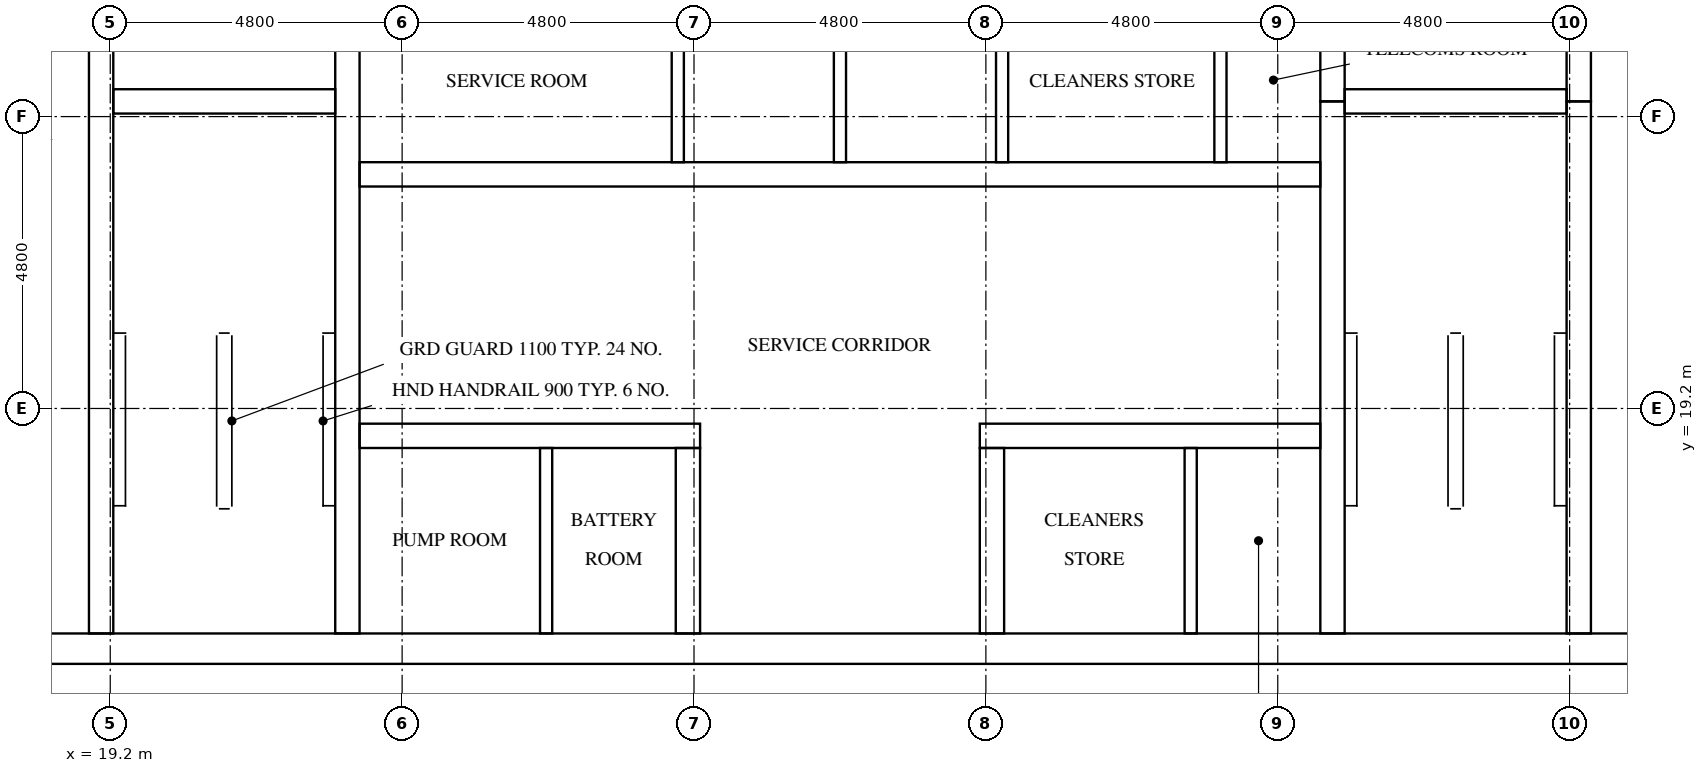
"""IFC4 building model, lengths in metres.
Left out: names, types, materials, properties, quantities, classifications, styles, units other than length and angle.
Written with IfcOpenShell. Run it as: python <this file> out.ifc"""

import sys

from ifc_helpers import new_model, si_unit, direction, frame, frame_2d, origin, place, context, subcontext, project, spatial, rectangle, extrude, element, fill, save


model = new_model("IFC4")
c1 = context("Model", 3, precision=1e-05, world=origin(), true_north=direction((0.0, 1.0)))
c2 = subcontext(c1, "Body", "Model", "MODEL_VIEW")
j1 = project(units=[si_unit("LENGTHUNIT", "METRE"), si_unit("PLANEANGLEUNIT", "RADIAN")], contexts=[c1])
p1 = place(None, origin())
s1 = spatial("IfcSite", under=j1, at=p1, CompositionType="ELEMENT")
p2 = place(p1, origin())
s2 = spatial("IfcBuilding", under=s1, at=p2, CompositionType="ELEMENT")
p3 = place(p2, frame((0.0, 0.0, 282.6)))
s3 = spatial("IfcBuildingStorey", under=s2, at=p3, CompositionType="ELEMENT", Elevation=282.6)
p4 = place(p3, frame((15.0, 15.25, 0.0), z_axis=(0.0, 0.0, 1.0), x_axis=(1.0, 0.0, 0.0)))
e1 = element("IfcWall", 1, at=p4, inside=s3, PredefinedType="SHEAR", context=c2, shape_type="SweptSolid", body=[
    extrude(rectangle(XDim=32.4, YDim=0.5, at=frame_2d((16.2, 0.0))), origin(), (0.0, 0.0, 1.0), 3.2),
])
p5 = place(p4, frame((15.3, 0.0, 0.0)))
e2 = element("IfcOpeningElement", 2, at=p5, cuts=e1, PredefinedType="OPENING", context=c2, shape_type="SweptSolid", body=[
    extrude(rectangle(XDim=1.8, YDim=2.1, at=frame_2d((0.9, 1.05))), frame((0.0, 0.26, 0.0), z_axis=(0.0, -1.0, 0.0), x_axis=(1.0, 0.0, 0.0)), (0.0, 0.0, 1.0), 0.52),
])
p6 = place(p3, frame((19.05, 15.5, 0.0), z_axis=(0.0, 0.0, 1.0), x_axis=(0.0, 1.0, 0.0)))
e3 = element("IfcWall", 3, at=p6, inside=s3, PredefinedType="SHEAR", context=c2, shape_type="SweptSolid", body=[
    extrude(rectangle(XDim=15.55, YDim=0.4, at=frame_2d((7.775, 0.0))), origin(), (0.0, 0.0, 1.0), 3.2),
])
p7 = place(p6, frame((9.95, 0.0, 0.0)))
e4 = element("IfcOpeningElement", 4, at=p7, cuts=e3, PredefinedType="OPENING", context=c2, shape_type="SweptSolid", body=[
    extrude(rectangle(XDim=1.1, YDim=2.1, at=frame_2d((0.55, 1.05))), frame((0.0, 0.21, 0.0), z_axis=(0.0, -1.0, 0.0), x_axis=(1.0, 0.0, 0.0)), (0.0, 0.0, 1.0), 0.42),
])
p8 = place(p6, frame((13.45, 0.0, 0.0)))
e5 = element("IfcOpeningElement", 5, at=p8, cuts=e3, PredefinedType="OPENING", context=c2, shape_type="SweptSolid", body=[
    extrude(rectangle(XDim=1.1, YDim=2.1, at=frame_2d((0.55, 1.05))), frame((0.0, 0.21, 0.0), z_axis=(0.0, -1.0, 0.0), x_axis=(1.0, 0.0, 0.0)), (0.0, 0.0, 1.0), 0.42),
])
p9 = place(p6, frame((0.7, 0.0, 0.0)))
e6 = element("IfcOpeningElement", 6, at=p9, cuts=e3, PredefinedType="OPENING", context=c2, shape_type="SweptSolid", body=[
    extrude(rectangle(XDim=1.2, YDim=2.1, at=frame_2d((0.6, 1.05))), frame((0.0, 0.21, 0.0), z_axis=(0.0, -1.0, 0.0), x_axis=(1.0, 0.0, 0.0)), (0.0, 0.0, 1.0), 0.42),
])
p10 = place(p3, frame((23.1, 15.5, 0.0), z_axis=(0.0, 0.0, 1.0), x_axis=(0.0, 1.0, 0.0)))
e7 = element("IfcWall", 7, at=p10, inside=s3, PredefinedType="SHEAR", context=c2, shape_type="SweptSolid", body=[
    extrude(rectangle(XDim=21.8, YDim=0.4, at=frame_2d((10.9, 0.0))), origin(), (0.0, 0.0, 1.0), 3.2),
])
p11 = place(p3, frame((39.3, 15.5, 0.0), z_axis=(0.0, 0.0, 1.0), x_axis=(0.0, 1.0, 0.0)))
e8 = element("IfcWall", 8, at=p11, inside=s3, PredefinedType="SHEAR", context=c2, shape_type="SweptSolid", body=[
    extrude(rectangle(XDim=8.75, YDim=0.4, at=frame_2d((4.375, 0.0))), origin(), (0.0, 0.0, 1.0), 3.2),
])
p12 = place(p3, frame((39.3, 24.25, 0.0), z_axis=(0.0, 0.0, 1.0), x_axis=(0.0, 1.0, 0.0)))
e9 = element("IfcWall", 9, at=p12, inside=s3, PredefinedType="SHEAR", context=c2, shape_type="SweptSolid", body=[
    extrude(rectangle(XDim=3.5, YDim=0.4, at=frame_2d((1.75, 0.0))), origin(), (0.0, 0.0, 1.0), 3.2),
])
p13 = place(p3, frame((43.35, 15.5, 0.0), z_axis=(0.0, 0.0, 1.0), x_axis=(0.0, 1.0, 0.0)))
e10 = element("IfcWall", 10, at=p13, inside=s3, PredefinedType="SHEAR", context=c2, shape_type="SweptSolid", body=[
    extrude(rectangle(XDim=8.75, YDim=0.4, at=frame_2d((4.375, 0.0))), origin(), (0.0, 0.0, 1.0), 3.2),
])
p14 = place(p13, frame((0.7, 0.0, 0.0)))
e11 = element("IfcOpeningElement", 11, at=p14, cuts=e10, PredefinedType="OPENING", context=c2, shape_type="SweptSolid", body=[
    extrude(rectangle(XDim=1.2, YDim=2.1, at=frame_2d((0.6, 1.05))), frame((0.0, 0.21, 0.0), z_axis=(0.0, -1.0, 0.0), x_axis=(1.0, 0.0, 0.0)), (0.0, 0.0, 1.0), 0.42),
])
p15 = place(p3, frame((43.35, 24.25, 0.0), z_axis=(0.0, 0.0, 1.0), x_axis=(0.0, 1.0, 0.0)))
e12 = element("IfcWall", 12, at=p15, inside=s3, PredefinedType="SHEAR", context=c2, shape_type="SweptSolid", body=[
    extrude(rectangle(XDim=3.5, YDim=0.4, at=frame_2d((1.75, 0.0))), origin(), (0.0, 0.0, 1.0), 3.2),
])
p16 = place(p15, frame((1.2, 0.0, 0.0)))
e13 = element("IfcOpeningElement", 13, at=p16, cuts=e12, PredefinedType="OPENING", context=c2, shape_type="SweptSolid", body=[
    extrude(rectangle(XDim=1.1, YDim=2.1, at=frame_2d((0.55, 1.05))), frame((0.0, 0.21, 0.0), z_axis=(0.0, -1.0, 0.0), x_axis=(1.0, 0.0, 0.0)), (0.0, 0.0, 1.0), 0.42),
])
for number, where, z_axis, x_axis in (
    (14, (19.25, 24.25, 0.0), (0.0, 0.0, 1.0), (1.0, 0.0, 0.0)),
    (15, (39.5, 24.25, 0.0), (0.0, 0.0, 1.0), (1.0, 0.0, 0.0)),
):
    element("IfcWall", number, at=place(p3, frame(where, z_axis=z_axis, x_axis=x_axis)), inside=s3, PredefinedType="SHEAR", context=c2, shape_type="SweptSolid", body=[
        extrude(rectangle(XDim=3.65, YDim=0.4, at=frame_2d((1.825, 0.0))), origin(), (0.0, 0.0, 1.0), 3.2),
    ])
p17 = place(p3, frame((23.3, 18.75, 0.0), z_axis=(0.0, 0.0, 1.0), x_axis=(1.0, 0.0, 0.0)))
e16 = element("IfcWall", 16, at=p17, inside=s3, PredefinedType="SHEAR", context=c2, shape_type="SweptSolid", body=[
    extrude(rectangle(XDim=5.6, YDim=0.4, at=frame_2d((2.8, 0.0))), origin(), (0.0, 0.0, 1.0), 3.2),
])
p18 = place(p17, frame((0.984, 0.0, 0.0)))
e17 = element("IfcOpeningElement", 17, at=p18, cuts=e16, PredefinedType="OPENING", context=c2, shape_type="SweptSolid", body=[
    extrude(rectangle(XDim=1.0, YDim=2.1, at=frame_2d((0.5, 1.05))), frame((0.0, 0.21, 0.0), z_axis=(0.0, -1.0, 0.0), x_axis=(1.0, 0.0, 0.0)), (0.0, 0.0, 1.0), 0.42),
])
p19 = place(p17, frame((3.684, 0.0, 0.0)))
e18 = element("IfcOpeningElement", 18, at=p19, cuts=e16, PredefinedType="OPENING", context=c2, shape_type="SweptSolid", body=[
    extrude(rectangle(XDim=1.0, YDim=2.1, at=frame_2d((0.5, 1.05))), frame((0.0, 0.21, 0.0), z_axis=(0.0, -1.0, 0.0), x_axis=(1.0, 0.0, 0.0)), (0.0, 0.0, 1.0), 0.42),
])
p20 = place(p3, frame((33.5, 18.75, 0.0), z_axis=(0.0, 0.0, 1.0), x_axis=(1.0, 0.0, 0.0)))
e19 = element("IfcWall", 19, at=p20, inside=s3, PredefinedType="SHEAR", context=c2, shape_type="SweptSolid", body=[
    extrude(rectangle(XDim=5.6, YDim=0.4, at=frame_2d((2.8, 0.0))), origin(), (0.0, 0.0, 1.0), 3.2),
])
p21 = place(p20, frame((1.384, 0.0, 0.0)))
e20 = element("IfcOpeningElement", 20, at=p21, cuts=e19, PredefinedType="OPENING", context=c2, shape_type="SweptSolid", body=[
    extrude(rectangle(XDim=1.0, YDim=2.1, at=frame_2d((0.5, 1.05))), frame((0.0, 0.21, 0.0), z_axis=(0.0, -1.0, 0.0), x_axis=(1.0, 0.0, 0.0)), (0.0, 0.0, 1.0), 0.42),
])
p22 = place(p20, frame((4.084, 0.0, 0.0)))
e21 = element("IfcOpeningElement", 21, at=p22, cuts=e19, PredefinedType="OPENING", context=c2, shape_type="SweptSolid", body=[
    extrude(rectangle(XDim=1.0, YDim=2.1, at=frame_2d((0.5, 1.05))), frame((0.0, 0.21, 0.0), z_axis=(0.0, -1.0, 0.0), x_axis=(1.0, 0.0, 0.0)), (0.0, 0.0, 1.0), 0.42),
])
p23 = place(p3, frame((23.3, 23.05, 0.0), z_axis=(0.0, 0.0, 1.0), x_axis=(1.0, 0.0, 0.0)))
e22 = element("IfcWall", 22, at=p23, inside=s3, PredefinedType="SHEAR", context=c2, shape_type="SweptSolid", body=[
    extrude(rectangle(XDim=15.8, YDim=0.4, at=frame_2d((7.9, 0.0))), origin(), (0.0, 0.0, 1.0), 3.2),
])
p24 = place(p23, frame((2.067, 0.0, 0.0)))
e23 = element("IfcOpeningElement", 23, at=p24, cuts=e22, PredefinedType="OPENING", context=c2, shape_type="SweptSolid", body=[
    extrude(rectangle(XDim=1.0, YDim=2.1, at=frame_2d((0.5, 1.05))), frame((0.0, 0.21, 0.0), z_axis=(0.0, -1.0, 0.0), x_axis=(1.0, 0.0, 0.0)), (0.0, 0.0, 1.0), 0.42),
])
p25 = place(p23, frame((11.862, 0.0, 0.0)))
e24 = element("IfcOpeningElement", 24, at=p25, cuts=e22, PredefinedType="OPENING", context=c2, shape_type="SweptSolid", body=[
    extrude(rectangle(XDim=1.0, YDim=2.1, at=frame_2d((0.5, 1.05))), frame((0.0, 0.21, 0.0), z_axis=(0.0, -1.0, 0.0), x_axis=(1.0, 0.0, 0.0)), (0.0, 0.0, 1.0), 0.42),
])
p26 = place(p23, frame((14.529, 0.0, 0.0)))
e25 = element("IfcOpeningElement", 25, at=p26, cuts=e22, PredefinedType="OPENING", context=c2, shape_type="SweptSolid", body=[
    extrude(rectangle(XDim=1.0, YDim=2.1, at=frame_2d((0.5, 1.05))), frame((0.0, 0.21, 0.0), z_axis=(0.0, -1.0, 0.0), x_axis=(1.0, 0.0, 0.0)), (0.0, 0.0, 1.0), 0.42),
])
for number, where, z_axis, x_axis in (
    (26, (28.7, 15.5, 0.0), (0.0, 0.0, 1.0), (0.0, 1.0, 0.0)),
    (27, (33.7, 15.5, 0.0), (0.0, 0.0, 1.0), (0.0, 1.0, 0.0)),
):
    element("IfcWall", number, at=place(p3, frame(where, z_axis=z_axis, x_axis=x_axis)), inside=s3, PredefinedType="SHEAR", context=c2, shape_type="SweptSolid", body=[
        extrude(rectangle(XDim=3.05, YDim=0.4, at=frame_2d((1.525, 0.0))), origin(), (0.0, 0.0, 1.0), 3.2),
    ])
for number, where, z_axis, x_axis in (
    (28, (28.533, 23.25, 0.0), (0.0, 0.0, 1.0), (0.0, 1.0, 0.0)),
    (29, (31.2, 23.25, 0.0), (0.0, 0.0, 1.0), (0.0, 1.0, 0.0)),
    (30, (33.867, 23.25, 0.0), (0.0, 0.0, 1.0), (0.0, 1.0, 0.0)),
):
    element("IfcWall", number, at=place(p3, frame(where, z_axis=z_axis, x_axis=x_axis)), inside=s3, PredefinedType="SOLIDWALL", context=c2, shape_type="SweptSolid", body=[
        extrude(rectangle(XDim=2.7, YDim=0.2, at=frame_2d((1.35, 0.0))), origin(), (0.0, 0.0, 1.0), 3.2),
    ])
p27 = place(p3, frame((37.457, 23.25, 0.0), z_axis=(0.0, 0.0, 1.0), x_axis=(0.0, 1.0, 0.0)))
e31 = element("IfcWall", 31, at=p27, inside=s3, PredefinedType="PARTITIONING", context=c2, shape_type="SweptSolid", body=[
    extrude(rectangle(XDim=2.7, YDim=0.2, at=frame_2d((1.35, 0.0))), origin(), (0.0, 0.0, 1.0), 3.2),
])
for number, where, z_axis, x_axis in (
    (32, (26.368, 15.5, 0.0), (0.0, 0.0, 1.0), (0.0, 1.0, 0.0)),
    (33, (36.968, 15.5, 0.0), (0.0, 0.0, 1.0), (0.0, 1.0, 0.0)),
):
    element("IfcWall", number, at=place(p3, frame(where, z_axis=z_axis, x_axis=x_axis)), inside=s3, PredefinedType="PARTITIONING", context=c2, shape_type="SweptSolid", body=[
        extrude(rectangle(XDim=3.05, YDim=0.2, at=frame_2d((1.525, 0.0))), origin(), (0.0, 0.0, 1.0), 3.2),
    ])
p28 = place(p9, frame((1.2, 0.0, 0.0), z_axis=(0.0, 0.0, 1.0), x_axis=(-1.0, 0.0, 0.0)))
e34 = element("IfcDoor", 34, at=p28, inside=s3, OperationType="SINGLE_SWING_RIGHT", PredefinedType="DOOR", context=c2, shape_type="SweptSolid", body=[
    extrude(rectangle(XDim=1.2, YDim=2.1, at=frame_2d((0.6, 1.05))), frame((0.0, 0.025, 0.0), z_axis=(0.0, -1.0, 0.0), x_axis=(1.0, 0.0, 0.0)), (0.0, 0.0, 1.0), 0.05),
])
fill(e6, e34)
p29 = place(p14, origin())
e35 = element("IfcDoor", 35, at=p29, inside=s3, OperationType="SINGLE_SWING_LEFT", PredefinedType="DOOR", context=c2, shape_type="SweptSolid", body=[
    extrude(rectangle(XDim=1.2, YDim=2.1, at=frame_2d((0.6, 1.05))), frame((0.0, 0.025, 0.0), z_axis=(0.0, -1.0, 0.0), x_axis=(1.0, 0.0, 0.0)), (0.0, 0.0, 1.0), 0.05),
])
fill(e11, e35)
p30 = place(p5, frame((1.8, 0.0, 0.0), z_axis=(0.0, 0.0, 1.0), x_axis=(-1.0, 0.0, 0.0)))
e36 = element("IfcDoor", 36, at=p30, inside=s3, OperationType="DOUBLE_DOOR_SINGLE_SWING", PredefinedType="DOOR", context=c2, shape_type="SweptSolid", body=[
    extrude(rectangle(XDim=1.8, YDim=2.1, at=frame_2d((0.9, 1.05))), frame((0.0, 0.025, 0.0), z_axis=(0.0, -1.0, 0.0), x_axis=(1.0, 0.0, 0.0)), (0.0, 0.0, 1.0), 0.05),
])
fill(e2, e36)
p31 = place(p24, frame((1.0, 0.0, 0.0), z_axis=(0.0, 0.0, 1.0), x_axis=(-1.0, 0.0, 0.0)))
e37 = element("IfcDoor", 37, at=p31, inside=s3, OperationType="SINGLE_SWING_LEFT", PredefinedType="DOOR", context=c2, shape_type="SweptSolid", body=[
    extrude(rectangle(XDim=1.0, YDim=2.1, at=frame_2d((0.5, 1.05))), frame((0.0, 0.025, 0.0), z_axis=(0.0, -1.0, 0.0), x_axis=(1.0, 0.0, 0.0)), (0.0, 0.0, 1.0), 0.05),
])
fill(e23, e37)
p32 = place(p25, frame((1.0, 0.0, 0.0), z_axis=(0.0, 0.0, 1.0), x_axis=(-1.0, 0.0, 0.0)))
e38 = element("IfcDoor", 38, at=p32, inside=s3, OperationType="SINGLE_SWING_RIGHT", PredefinedType="DOOR", context=c2, shape_type="SweptSolid", body=[
    extrude(rectangle(XDim=1.0, YDim=2.1, at=frame_2d((0.5, 1.05))), frame((0.0, 0.025, 0.0), z_axis=(0.0, -1.0, 0.0), x_axis=(1.0, 0.0, 0.0)), (0.0, 0.0, 1.0), 0.05),
])
fill(e24, e38)
p33 = place(p26, frame((1.0, 0.0, 0.0), z_axis=(0.0, 0.0, 1.0), x_axis=(-1.0, 0.0, 0.0)))
e39 = element("IfcDoor", 39, at=p33, inside=s3, OperationType="SINGLE_SWING_LEFT", PredefinedType="DOOR", context=c2, shape_type="SweptSolid", body=[
    extrude(rectangle(XDim=1.0, YDim=2.1, at=frame_2d((0.5, 1.05))), frame((0.0, 0.025, 0.0), z_axis=(0.0, -1.0, 0.0), x_axis=(1.0, 0.0, 0.0)), (0.0, 0.0, 1.0), 0.05),
])
fill(e25, e39)
p34 = place(p18, origin())
e40 = element("IfcDoor", 40, at=p34, inside=s3, OperationType="SINGLE_SWING_RIGHT", PredefinedType="DOOR", context=c2, shape_type="SweptSolid", body=[
    extrude(rectangle(XDim=1.0, YDim=2.1, at=frame_2d((0.5, 1.05))), frame((0.0, 0.025, 0.0), z_axis=(0.0, -1.0, 0.0), x_axis=(1.0, 0.0, 0.0)), (0.0, 0.0, 1.0), 0.05),
])
fill(e17, e40)
p35 = place(p19, origin())
e41 = element("IfcDoor", 41, at=p35, inside=s3, OperationType="SINGLE_SWING_LEFT", PredefinedType="DOOR", context=c2, shape_type="SweptSolid", body=[
    extrude(rectangle(XDim=1.0, YDim=2.1, at=frame_2d((0.5, 1.05))), frame((0.0, 0.025, 0.0), z_axis=(0.0, -1.0, 0.0), x_axis=(1.0, 0.0, 0.0)), (0.0, 0.0, 1.0), 0.05),
])
fill(e18, e41)
p36 = place(p21, origin())
e42 = element("IfcDoor", 42, at=p36, inside=s3, OperationType="SINGLE_SWING_RIGHT", PredefinedType="DOOR", context=c2, shape_type="SweptSolid", body=[
    extrude(rectangle(XDim=1.0, YDim=2.1, at=frame_2d((0.5, 1.05))), frame((0.0, 0.025, 0.0), z_axis=(0.0, -1.0, 0.0), x_axis=(1.0, 0.0, 0.0)), (0.0, 0.0, 1.0), 0.05),
])
fill(e20, e42)
p37 = place(p22, origin())
e43 = element("IfcDoor", 43, at=p37, inside=s3, OperationType="SINGLE_SWING_LEFT", PredefinedType="DOOR", context=c2, shape_type="SweptSolid", body=[
    extrude(rectangle(XDim=1.0, YDim=2.1, at=frame_2d((0.5, 1.05))), frame((0.0, 0.025, 0.0), z_axis=(0.0, -1.0, 0.0), x_axis=(1.0, 0.0, 0.0)), (0.0, 0.0, 1.0), 0.05),
])
fill(e21, e43)
save(model, sys.argv[1])
